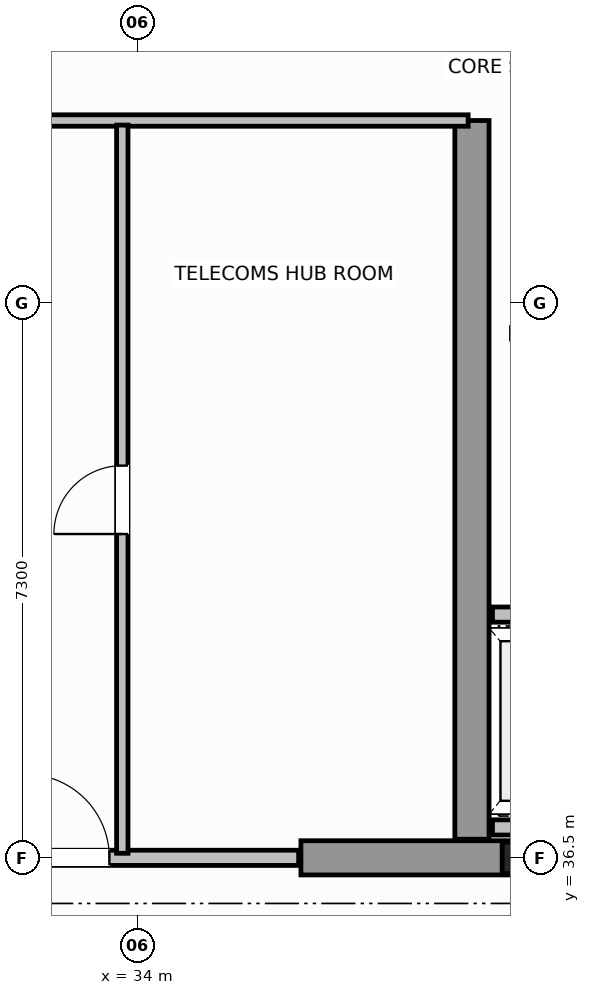
"""IFC4 building model, lengths in metres.
Left out: names, types, materials, properties, quantities, classifications, styles, units other than length and angle.
Written with IfcOpenShell. Run it as: python <this file> out.ifc"""

import sys

from ifc_helpers import new_model, si_unit, direction, frame, frame_2d, origin, origin_2d, place, context, subcontext, project, spatial, rectangle, i_section, extrude, source, transform, mapped, element, fill, save


model = new_model("IFC4")
c1 = context("Model", 3, precision=1e-05, world=origin(), true_north=direction((0.0, 1.0)))
c2 = subcontext(c1, "Body", "Model", "MODEL_VIEW")
j1 = project(units=[si_unit("LENGTHUNIT", "METRE"), si_unit("PLANEANGLEUNIT", "RADIAN")], contexts=[c1])
p1 = place(None, origin())
s1 = spatial("IfcSite", under=j1, at=p1, CompositionType="ELEMENT")
p2 = place(p1, origin())
s2 = spatial("IfcBuilding", under=s1, at=p2, CompositionType="ELEMENT")
p3 = place(p2, frame((0.0, 0.0, 284.0)))
s3 = spatial("IfcBuildingStorey", under=s2, at=p3, CompositionType="ELEMENT", Elevation=284.0)
m1 = source(origin(), c2, "Body", "SweptSolid", [
    extrude(i_section(OverallWidth=0.406, OverallDepth=0.416, WebThickness=0.03, FlangeThickness=0.042, FilletRadius=0.015, at=origin_2d()), origin(), (0.0, 0.0, 1.0), 3.8),
])
p4 = place(p3, frame((39.0, 36.5, 0.0), z_axis=(0.0, 0.0, 1.0), x_axis=(1.0, 0.0, 0.0)))
e1 = element("IfcColumn", 1, at=p4, inside=s3, PredefinedType="COLUMN", context=c2, shape_type="MappedRepresentation", body=[
    mapped(m1, transform((0.0, 0.0, 0.0), scale=1.0)),
])
p5 = place(p3, frame((36.15, 36.5, 0.0), z_axis=(0.0, 0.0, 1.0), x_axis=(1.0, 0.0, 0.0)))
e2 = element("IfcWall", 2, at=p5, inside=s3, PredefinedType="SHEAR", context=c2, shape_type="SweptSolid", body=[
    extrude(rectangle(XDim=4.5, YDim=0.45, at=frame_2d((2.25, 0.0))), origin(), (0.0, 0.0, 1.0), 3.8),
])
p6 = place(p3, frame((38.4, 36.745, 0.0), z_axis=(0.0, 0.0, 1.0), x_axis=(0.0, 1.0, 0.0)))
e3 = element("IfcWall", 3, at=p6, inside=s3, PredefinedType="SHEAR", context=c2, shape_type="SweptSolid", body=[
    extrude(rectangle(XDim=9.455, YDim=0.45, at=frame_2d((4.728, 0.0))), origin(), (0.0, 0.0, 1.0), 3.8),
])
p7 = place(p3, frame((38.67, 39.7, 0.0), z_axis=(0.0, 0.0, 1.0), x_axis=(1.0, 0.0, 0.0)))
e4 = element("IfcWall", 4, at=p7, inside=s3, PredefinedType="SOLIDWALL", context=c2, shape_type="SweptSolid", body=[
    extrude(rectangle(XDim=1.96, YDim=0.2, at=frame_2d((0.98, 0.0))), origin(), (0.0, 0.0, 1.0), 3.58),
])
p8 = place(p7, frame((0.43, 0.0, 0.0)))
e5 = element("IfcOpeningElement", 5, at=p8, cuts=e4, PredefinedType="OPENING", context=c2, shape_type="SweptSolid", body=[
    extrude(rectangle(XDim=1.1, YDim=2.15, at=frame_2d((0.55, 1.075))), frame((0.0, 0.11, 0.0), z_axis=(0.0, -1.0, 0.0), x_axis=(1.0, 0.0, 0.0)), (0.0, 0.0, 1.0), 0.22),
])
p9 = place(p3, frame((38.67, 36.9, 0.0), z_axis=(0.0, 0.0, 1.0), x_axis=(1.0, 0.0, 0.0)))
e6 = element("IfcWall", 6, at=p9, inside=s3, PredefinedType="SOLIDWALL", context=c2, shape_type="SweptSolid", body=[
    extrude(rectangle(XDim=1.96, YDim=0.2, at=frame_2d((0.98, 0.0))), origin(), (0.0, 0.0, 1.0), 3.58),
])
p10 = place(p3, frame((32.08, 36.5, 0.0), z_axis=(0.0, 0.0, 1.0), x_axis=(1.0, 0.0, 0.0)))
e7 = element("IfcWall", 7, at=p10, inside=s3, PredefinedType="SOLIDWALL", context=c2, shape_type="SweptSolid", body=[
    extrude(rectangle(XDim=4.04, YDim=0.2, at=frame_2d((2.02, 0.0))), origin(), (0.0, 0.0, 1.0), 3.12),
])
p11 = place(p10, frame((0.45, 0.0, 0.0)))
e8 = element("IfcOpeningElement", 8, at=p11, cuts=e7, PredefinedType="OPENING", context=c2, shape_type="SweptSolid", body=[
    extrude(rectangle(XDim=1.1, YDim=2.15, at=frame_2d((0.55, 1.075))), frame((0.0, 0.11, 0.0), z_axis=(0.0, -1.0, 0.0), x_axis=(1.0, 0.0, 0.0)), (0.0, 0.0, 1.0), 0.22),
])
p12 = place(p3, frame((29.85, 46.2, 0.0), z_axis=(0.0, 0.0, 1.0), x_axis=(1.0, 0.0, 0.0)))
e9 = element("IfcWall", 9, at=p12, inside=s3, PredefinedType="PARTITIONING", context=c2, shape_type="SweptSolid", body=[
    extrude(rectangle(XDim=8.5, YDim=0.15, at=frame_2d((4.25, 0.0))), origin(), (0.0, 0.0, 1.0), 3.58),
])
p13 = place(p3, frame((33.8, 36.56, 0.0), z_axis=(0.0, 0.0, 1.0), x_axis=(0.0, 1.0, 0.0)))
e10 = element("IfcWall", 10, at=p13, inside=s3, PredefinedType="PARTITIONING", context=c2, shape_type="SweptSolid", body=[
    extrude(rectangle(XDim=9.58, YDim=0.15, at=frame_2d((4.79, 0.0))), origin(), (0.0, 0.0, 1.0), 3.58),
])
p14 = place(p13, frame((4.2, 0.0, 0.0)))
e11 = element("IfcOpeningElement", 11, at=p14, cuts=e10, PredefinedType="OPENING", context=c2, shape_type="SweptSolid", body=[
    extrude(rectangle(XDim=0.9, YDim=2.1, at=frame_2d((0.45, 1.05))), frame((0.0, 0.085, 0.0), z_axis=(0.0, -1.0, 0.0), x_axis=(1.0, 0.0, 0.0)), (0.0, 0.0, 1.0), 0.17),
])
m2 = source(origin(), c2, "Body", "SweptSolid", [
    extrude(rectangle(XDim=1.1, YDim=2.15, at=frame_2d((0.55, 1.075))), frame((0.0, 0.025, 0.0), z_axis=(0.0, -1.0, 0.0), x_axis=(1.0, 0.0, 0.0)), (0.0, 0.0, 1.0), 0.05),
])
p15 = place(p11, origin())
e12 = element("IfcDoor", 12, at=p15, inside=s3, OperationType="SINGLE_SWING_LEFT", PredefinedType="DOOR", context=c2, shape_type="MappedRepresentation", body=[
    mapped(m2, transform((0.0, 0.0, 0.0), scale=1.0)),
])
fill(e8, e12)
m3 = source(origin(), c2, "Body", "SweptSolid", [
    extrude(rectangle(XDim=0.9, YDim=2.1, at=frame_2d((0.45, 1.05))), frame((0.0, 0.025, 0.0), z_axis=(0.0, -1.0, 0.0), x_axis=(1.0, 0.0, 0.0)), (0.0, 0.0, 1.0), 0.05),
])
p16 = place(p14, origin())
e13 = element("IfcDoor", 13, at=p16, inside=s3, OperationType="SINGLE_SWING_RIGHT", PredefinedType="DOOR", context=c2, shape_type="MappedRepresentation", body=[
    mapped(m3, transform((0.0, 0.0, 0.0), scale=1.0)),
])
fill(e11, e13)
save(model, sys.argv[1])
